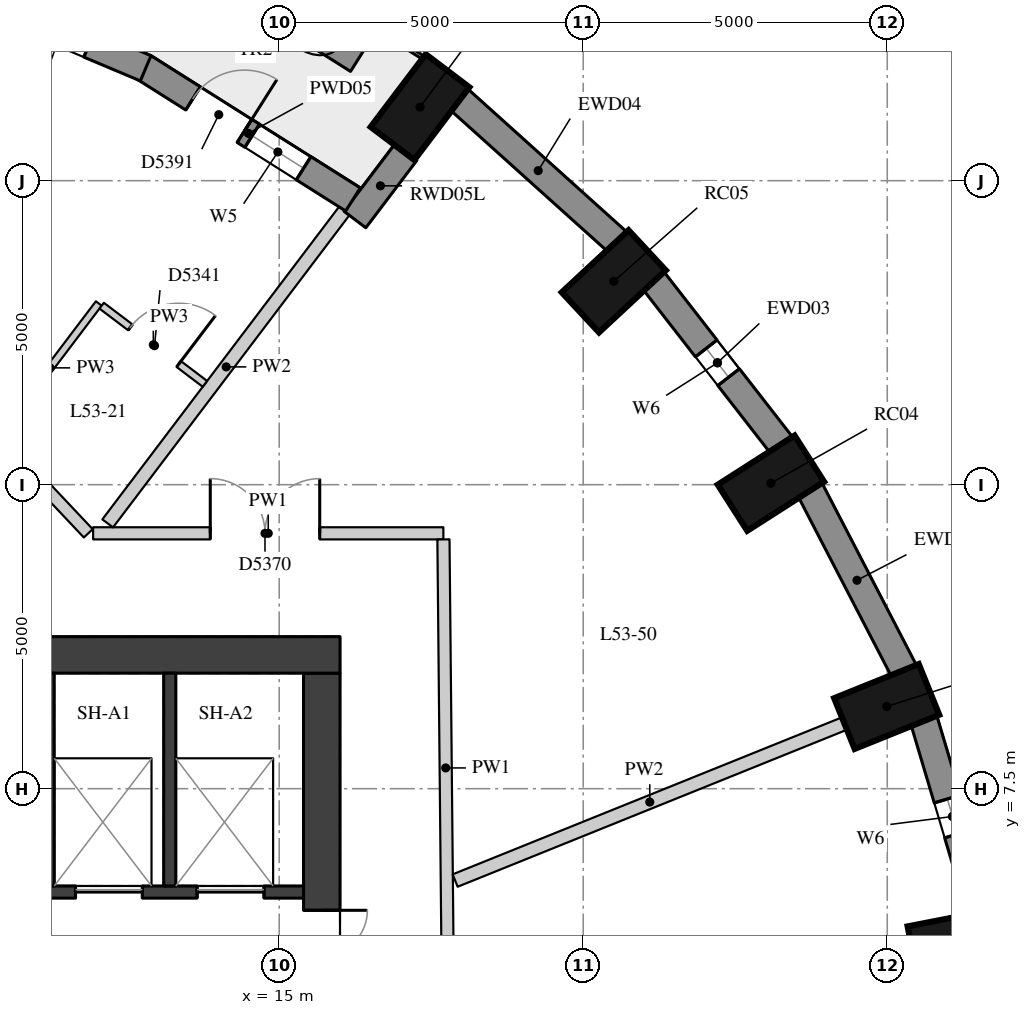
"""IFC4 building model, lengths in metres.
Left out: names, types, materials, properties, quantities, classifications, styles, units other than length and angle.
Written with IfcOpenShell. Run it as: python <this file> out.ifc"""

import sys

from ifc_helpers import new_model, si_unit, direction, frame, frame_2d, origin, origin_2d, place, context, subcontext, project, spatial, rectangle, extrude, element, fill, save


model = new_model("IFC4")
c1 = context("Model", 3, precision=1e-05, world=origin(), true_north=direction((0.0, 1.0)))
c2 = subcontext(c1, "Body", "Model", "MODEL_VIEW")
j1 = project(units=[si_unit("LENGTHUNIT", "METRE"), si_unit("PLANEANGLEUNIT", "RADIAN")], contexts=[c1])
p1 = place(None, origin())
s1 = spatial("IfcSite", under=j1, at=p1, CompositionType="ELEMENT")
p2 = place(p1, origin())
s2 = spatial("IfcBuilding", under=s1, at=p2, CompositionType="ELEMENT")
p3 = place(p2, frame((0.0, 0.0, 189.2)))
s3 = spatial("IfcBuildingStorey", under=s2, at=p3, CompositionType="ELEMENT", Elevation=189.2)
for number, where, z_axis, x_axis in (
    (1, (26.157, 4.937, 0.0), (0.0, 0.0, 1.0), (0.981, 0.192, 0.0)),
    (2, (24.991, 8.852, 0.0), (0.0, 0.0, 1.0), (0.927, 0.374, 0.0)),
    (3, (23.087, 12.525, 0.0), (0.0, 0.0, 1.0), (0.842, 0.539, 0.0)),
    (4, (20.502, 15.845, 0.0), (0.0, 0.0, 1.0), (0.732, 0.681, 0.0)),
    (5, (17.316, 18.71, 0.0), (0.0, 0.0, 1.0), (0.604, 0.797, 0.0)),
):
    element("IfcColumn", number, at=place(p3, frame(where, z_axis=z_axis, x_axis=x_axis)), inside=s3, PredefinedType="COLUMN", context=c2, shape_type="SweptSolid", body=[
        extrude(rectangle(XDim=1.5, YDim=0.9, at=origin_2d()), origin(), (0.0, 0.0, 1.0), 3.3),
    ])
p4 = place(p3, frame((26.548, 5.452, 0.0), z_axis=(0.0, 0.0, 1.0), x_axis=(-0.285444972963, 0.958395099847, 0.0)))
e6 = element("IfcWall", 6, at=p4, inside=s3, PredefinedType="SOLIDWALL", context=c2, shape_type="SweptSolid", body=[
    extrude(rectangle(XDim=3.32, YDim=0.45, at=frame_2d((1.66, 0.0))), origin(), (0.0, 0.0, 1.0), 3.02),
])
p5 = place(p4, frame((1.36, 0.0, 0.4)))
e7 = element("IfcOpeningElement", 7, at=p5, cuts=e6, PredefinedType="OPENING", context=c2, shape_type="SweptSolid", body=[
    extrude(rectangle(XDim=0.6, YDim=1.75, at=frame_2d((0.3, 0.875))), frame((0.0, 0.235, 0.0), z_axis=(0.0, -1.0, 0.0), x_axis=(1.0, 0.0, 0.0)), (0.0, 0.0, 1.0), 0.47),
])
p6 = place(p3, frame((25.278, 9.432, 0.0), z_axis=(0.0, 0.0, 1.0), x_axis=(-0.460175500475, 0.887827972505, 0.0)))
e8 = element("IfcWall", 8, at=p6, inside=s3, PredefinedType="SOLIDWALL", context=c2, shape_type="SweptSolid", body=[
    extrude(rectangle(XDim=3.371, YDim=0.45, at=frame_2d((1.685, 0.0))), origin(), (0.0, 0.0, 1.0), 3.02),
])
p7 = place(p3, frame((23.263, 13.148, 0.0), z_axis=(0.0, 0.0, 1.0), x_axis=(-0.614220816451, 0.789134201919, 0.0)))
e9 = element("IfcWall", 9, at=p7, inside=s3, PredefinedType="SOLIDWALL", context=c2, shape_type="SweptSolid", body=[
    extrude(rectangle(XDim=3.438, YDim=0.45, at=frame_2d((1.719, 0.0))), origin(), (0.0, 0.0, 1.0), 3.02),
])
p8 = place(p7, frame((1.419, 0.0, 0.4)))
e10 = element("IfcOpeningElement", 10, at=p8, cuts=e9, PredefinedType="OPENING", context=c2, shape_type="SweptSolid", body=[
    extrude(rectangle(XDim=0.6, YDim=1.75, at=frame_2d((0.3, 0.875))), frame((0.0, 0.235, 0.0), z_axis=(0.0, -1.0, 0.0), x_axis=(1.0, 0.0, 0.0)), (0.0, 0.0, 1.0), 0.47),
])
p9 = place(p3, frame((20.565, 16.49, 0.0), z_axis=(0.0, 0.0, 1.0), x_axis=(-0.743442727602, 0.668799604348, 0.0)))
e11 = element("IfcWall", 11, at=p9, inside=s3, PredefinedType="SOLIDWALL", context=c2, shape_type="SweptSolid", body=[
    extrude(rectangle(XDim=3.513, YDim=0.45, at=frame_2d((1.756, 0.0))), origin(), (0.0, 0.0, 1.0), 3.02),
])
p10 = place(p3, frame((17.085, 17.97, 0.0), z_axis=(0.0, 0.0, 1.0), x_axis=(-0.603644757989, -0.797253414011, 0.0)))
e12 = element("IfcWall", 12, at=p10, inside=s3, PredefinedType="SOLIDWALL", context=c2, shape_type="SweptSolid", body=[
    extrude(rectangle(XDim=1.391, YDim=0.45, at=frame_2d((0.695, 0.0))), origin(), (0.0, 0.0, 1.0), 3.02),
])
p11 = place(p3, frame((16.213, 17.192, 0.0), z_axis=(0.0, 0.0, 1.0), x_axis=(-0.84545185308, 0.534051649303, 0.0)))
e13 = element("IfcWall", 13, at=p11, inside=s3, PredefinedType="SOLIDWALL", context=c2, shape_type="SweptSolid", body=[
    extrude(rectangle(XDim=4.071, YDim=0.45, at=frame_2d((2.036, 0.0))), origin(), (0.0, 0.0, 1.0), 3.02),
])
p12 = place(p11, frame((0.961, 0.0, 0.4)))
e14 = element("IfcOpeningElement", 14, at=p12, cuts=e13, PredefinedType="OPENING", context=c2, shape_type="SweptSolid", body=[
    extrude(rectangle(XDim=1.0, YDim=1.75, at=frame_2d((0.5, 0.875))), frame((0.0, 0.235, 0.0), z_axis=(0.0, -1.0, 0.0), x_axis=(1.0, 0.0, 0.0)), (0.0, 0.0, 1.0), 0.47),
])
p13 = place(p11, frame((2.111, 0.0, 0.0)))
e15 = element("IfcOpeningElement", 15, at=p13, cuts=e13, PredefinedType="OPENING", context=c2, shape_type="SweptSolid", body=[
    extrude(rectangle(XDim=1.0, YDim=2.15, at=frame_2d((0.5, 1.075))), frame((0.0, 0.235, 0.0), z_axis=(0.0, -1.0, 0.0), x_axis=(1.0, 0.0, 0.0)), (0.0, 0.0, 1.0), 0.47),
])
p14 = place(p3, frame((12.804, 19.349, 0.0), z_axis=(0.0, 0.0, 1.0), x_axis=(-0.921751093055, 0.387782055351, 0.0)))
e16 = element("IfcWall", 16, at=p14, inside=s3, PredefinedType="SOLIDWALL", context=c2, shape_type="SweptSolid", body=[
    extrude(rectangle(XDim=4.168, YDim=0.45, at=frame_2d((2.084, 0.0))), origin(), (0.0, 0.0, 1.0), 3.02),
])
p15 = place(p14, frame((1.009, 0.0, 0.4)))
e17 = element("IfcOpeningElement", 17, at=p15, cuts=e16, PredefinedType="OPENING", context=c2, shape_type="SweptSolid", body=[
    extrude(rectangle(XDim=1.0, YDim=1.75, at=frame_2d((0.5, 0.875))), frame((0.0, 0.235, 0.0), z_axis=(0.0, -1.0, 0.0), x_axis=(1.0, 0.0, 0.0)), (0.0, 0.0, 1.0), 0.47),
])
p16 = place(p14, frame((2.159, 0.0, 0.0)))
e18 = element("IfcOpeningElement", 18, at=p16, cuts=e16, PredefinedType="OPENING", context=c2, shape_type="SweptSolid", body=[
    extrude(rectangle(XDim=1.0, YDim=2.15, at=frame_2d((0.5, 1.075))), frame((0.0, 0.235, 0.0), z_axis=(0.0, -1.0, 0.0), x_axis=(1.0, 0.0, 0.0)), (0.0, 0.0, 1.0), 0.47),
])
p17 = place(p3, frame((16.36, 19.593, 0.0), z_axis=(0.0, 0.0, 1.0), x_axis=(-0.846149017978, 0.532946375703, 0.0)))
e19 = element("IfcWall", 19, at=p17, inside=s3, PredefinedType="USERDEFINED", context=c2, shape_type="SweptSolid", body=[
    extrude(rectangle(XDim=1.8, YDim=0.7, at=frame_2d((0.9, 0.0))), origin(), (0.0, 0.0, 1.0), 0.75),
])
p18 = place(p3, frame((15.7, -9.4, 0.0), z_axis=(0.0, 0.0, 1.0), x_axis=(0.0, 1.0, 0.0)))
e20 = element("IfcWall", 20, at=p18, inside=s3, PredefinedType="SHEAR", context=c2, shape_type="SweptSolid", body=[
    extrude(rectangle(XDim=18.8, YDim=0.6, at=frame_2d((9.4, 0.0))), origin(), (0.0, 0.0, 1.0), 3.02),
])
p19 = place(p18, frame((13.4, 0.0, 0.0)))
e21 = element("IfcOpeningElement", 21, at=p19, cuts=e20, PredefinedType="OPENING", context=c2, shape_type="SweptSolid", body=[
    extrude(rectangle(XDim=1.5, YDim=2.1, at=frame_2d((0.75, 1.05))), frame((0.0, 0.31, 0.0), z_axis=(0.0, -1.0, 0.0), x_axis=(1.0, 0.0, 0.0)), (0.0, 0.0, 1.0), 0.62),
])
p20 = place(p18, frame((3.9, 0.0, 0.0)))
e22 = element("IfcOpeningElement", 22, at=p20, cuts=e20, PredefinedType="OPENING", context=c2, shape_type="SweptSolid", body=[
    extrude(rectangle(XDim=1.5, YDim=2.1, at=frame_2d((0.75, 1.05))), frame((0.0, 0.31, 0.0), z_axis=(0.0, -1.0, 0.0), x_axis=(1.0, 0.0, 0.0)), (0.0, 0.0, 1.0), 0.62),
])
p21 = place(p3, frame((4.0, 9.7, 0.0), z_axis=(0.0, 0.0, 1.0), x_axis=(1.0, 0.0, 0.0)))
e23 = element("IfcWall", 23, at=p21, inside=s3, PredefinedType="SHEAR", context=c2, shape_type="SweptSolid", body=[
    extrude(rectangle(XDim=12.0, YDim=0.6, at=frame_2d((6.0, 0.0))), origin(), (0.0, 0.0, 1.0), 3.02),
])
p22 = place(p3, frame((4.6, 5.8, 0.0), z_axis=(0.0, 0.0, 1.0), x_axis=(1.0, 0.0, 0.0)))
e24 = element("IfcWall", 24, at=p22, inside=s3, PredefinedType="SHEAR", context=c2, shape_type="SweptSolid", body=[
    extrude(rectangle(XDim=10.8, YDim=0.2, at=frame_2d((5.4, 0.0))), origin(), (0.0, 0.0, 1.0), 3.02),
])
p23 = place(p22, frame((7.05, 0.0, 0.0)))
e25 = element("IfcOpeningElement", 25, at=p23, cuts=e24, PredefinedType="OPENING", context=c2, shape_type="SweptSolid", body=[
    extrude(rectangle(XDim=1.1, YDim=2.1, at=frame_2d((0.55, 1.05))), frame((0.0, 0.11, 0.0), z_axis=(0.0, -1.0, 0.0), x_axis=(1.0, 0.0, 0.0)), (0.0, 0.0, 1.0), 0.22),
])
p24 = place(p22, frame((9.05, 0.0, 0.0)))
e26 = element("IfcOpeningElement", 26, at=p24, cuts=e24, PredefinedType="OPENING", context=c2, shape_type="SweptSolid", body=[
    extrude(rectangle(XDim=1.1, YDim=2.1, at=frame_2d((0.55, 1.05))), frame((0.0, 0.11, 0.0), z_axis=(0.0, -1.0, 0.0), x_axis=(1.0, 0.0, 0.0)), (0.0, 0.0, 1.0), 0.22),
])
for number, where, z_axis, x_axis in (
    (27, (11.2, 5.9, 0.0), (0.0, 0.0, 1.0), (0.0, 1.0, 0.0)),
    (28, (13.2, 5.9, 0.0), (0.0, 0.0, 1.0), (0.0, 1.0, 0.0)),
):
    element("IfcWall", number, at=place(p3, frame(where, z_axis=z_axis, x_axis=x_axis)), inside=s3, PredefinedType="SHEAR", context=c2, shape_type="SweptSolid", body=[
        extrude(rectangle(XDim=3.5, YDim=0.2, at=frame_2d((1.75, 0.0))), origin(), (0.0, 0.0, 1.0), 3.02),
    ])
p25 = place(p3, frame((9.916, 13.762, 0.0), z_axis=(0.0, 0.0, 1.0), x_axis=(0.686041532799, -0.727562378958, 0.0)))
e29 = element("IfcWall", 29, at=p25, inside=s3, PredefinedType="PARTITIONING", context=c2, shape_type="SweptSolid", body=[
    extrude(rectangle(XDim=2.834, YDim=0.2, at=frame_2d((1.417, 0.0))), origin(), (0.0, 0.0, 1.0), 3.02),
])
p26 = place(p3, frame((11.94, 11.7, 0.0), z_axis=(0.0, 0.0, 1.0), x_axis=(1.0, 0.0, 0.0)))
e30 = element("IfcWall", 30, at=p26, inside=s3, PredefinedType="PARTITIONING", context=c2, shape_type="SweptSolid", body=[
    extrude(rectangle(XDim=5.76, YDim=0.2, at=frame_2d((2.88, 0.0))), origin(), (0.0, 0.0, 1.0), 3.02),
])
p27 = place(p26, frame((1.927, 0.0, 0.0)))
e31 = element("IfcOpeningElement", 31, at=p27, cuts=e30, PredefinedType="OPENING", context=c2, shape_type="SweptSolid", body=[
    extrude(rectangle(XDim=1.8, YDim=2.1, at=frame_2d((0.9, 1.05))), frame((0.0, 0.11, 0.0), z_axis=(0.0, -1.0, 0.0), x_axis=(1.0, 0.0, 0.0)), (0.0, 0.0, 1.0), 0.22),
])
p28 = place(p3, frame((17.701, 11.6, 0.0), z_axis=(0.0, 0.0, 1.0), x_axis=(0.009840700525, -0.999951579134, 0.0)))
e32 = element("IfcWall", 32, at=p28, inside=s3, PredefinedType="PARTITIONING", context=c2, shape_type="SweptSolid", body=[
    extrude(rectangle(XDim=7.517, YDim=0.2, at=frame_2d((3.759, 0.0))), origin(), (0.0, 0.0, 1.0), 3.02),
])
p29 = place(p3, frame((24.295, 8.571, 0.0), z_axis=(0.0, 0.0, 1.0), x_axis=(-0.927397147779, -0.374078240869, 0.0)))
e33 = element("IfcWall", 33, at=p29, inside=s3, PredefinedType="PARTITIONING", context=c2, shape_type="SweptSolid", body=[
    extrude(rectangle(XDim=6.903, YDim=0.22, at=frame_2d((3.452, 0.0))), origin(), (0.0, 0.0, 1.0), 3.02),
])
p30 = place(p3, frame((16.077, 17.011, 0.0), z_axis=(0.0, 0.0, 1.0), x_axis=(-0.603635635975, -0.797260320712, 0.0)))
e34 = element("IfcWall", 34, at=p30, inside=s3, PredefinedType="PARTITIONING", context=c2, shape_type="SweptSolid", body=[
    extrude(rectangle(XDim=6.457, YDim=0.22, at=frame_2d((3.229, 0.0))), origin(), (0.0, 0.0, 1.0), 3.02),
])
p31 = place(p3, frame((10.43, 13.363, 0.0), z_axis=(0.0, 0.0, 1.0), x_axis=(0.603597479969, 0.797289208616, 0.0)))
e35 = element("IfcWall", 35, at=p31, inside=s3, PredefinedType="PARTITIONING", context=c2, shape_type="SweptSolid", body=[
    extrude(rectangle(XDim=2.656, YDim=0.12, at=frame_2d((1.328, 0.0))), origin(), (0.0, 0.0, 1.0), 3.02),
])
p32 = place(p3, frame((12.081, 15.444, 0.0), z_axis=(0.0, 0.0, 1.0), x_axis=(0.797240905551, -0.603661277967, 0.0)))
e36 = element("IfcWall", 36, at=p32, inside=s3, PredefinedType="PARTITIONING", context=c2, shape_type="SweptSolid", body=[
    extrude(rectangle(XDim=2.13, YDim=0.12, at=frame_2d((1.065, 0.0))), origin(), (0.0, 0.0, 1.0), 3.02),
])
p33 = place(p32, frame((0.59, 0.0, 0.0)))
e37 = element("IfcOpeningElement", 37, at=p33, cuts=e36, PredefinedType="OPENING", context=c2, shape_type="SweptSolid", body=[
    extrude(rectangle(XDim=1.0, YDim=2.1, at=frame_2d((0.5, 1.05))), frame((0.0, 0.07, 0.0), z_axis=(0.0, -1.0, 0.0), x_axis=(1.0, 0.0, 0.0)), (0.0, 0.0, 1.0), 0.14),
])
p34 = place(p5, origin())
e38 = element("IfcWindow", 38, at=p34, inside=s3, PartitioningType="SINGLE_PANEL", PredefinedType="WINDOW", context=c2, shape_type="SweptSolid", body=[
    extrude(rectangle(XDim=0.6, YDim=1.75, at=frame_2d((0.3, 0.875))), frame((0.0, 0.035, 0.0), z_axis=(0.0, -1.0, 0.0), x_axis=(1.0, 0.0, 0.0)), (0.0, 0.0, 1.0), 0.06),
])
fill(e7, e38)
p35 = place(p8, origin())
e39 = element("IfcWindow", 39, at=p35, inside=s3, PartitioningType="SINGLE_PANEL", PredefinedType="WINDOW", context=c2, shape_type="SweptSolid", body=[
    extrude(rectangle(XDim=0.6, YDim=1.75, at=frame_2d((0.3, 0.875))), frame((0.0, 0.035, 0.0), z_axis=(0.0, -1.0, 0.0), x_axis=(1.0, 0.0, 0.0)), (0.0, 0.0, 1.0), 0.06),
])
fill(e10, e39)
p36 = place(p12, origin())
e40 = element("IfcWindow", 40, at=p36, inside=s3, PartitioningType="SINGLE_PANEL", PredefinedType="WINDOW", context=c2, shape_type="SweptSolid", body=[
    extrude(rectangle(XDim=1.0, YDim=1.75, at=frame_2d((0.5, 0.875))), frame((0.0, 0.035, 0.0), z_axis=(0.0, -1.0, 0.0), x_axis=(1.0, 0.0, 0.0)), (0.0, 0.0, 1.0), 0.06),
])
fill(e14, e40)
p37 = place(p13, frame((1.0, 0.0, 0.0), z_axis=(0.0, 0.0, 1.0), x_axis=(-1.0, 0.0, 0.0)))
e41 = element("IfcDoor", 41, at=p37, inside=s3, OperationType="SINGLE_SWING_RIGHT", PredefinedType="DOOR", context=c2, shape_type="SweptSolid", body=[
    extrude(rectangle(XDim=1.0, YDim=2.15, at=frame_2d((0.5, 1.075))), frame((0.0, 0.075, 0.0), z_axis=(0.0, -1.0, 0.0), x_axis=(1.0, 0.0, 0.0)), (0.0, 0.0, 1.0), 0.05),
])
fill(e15, e41)
p38 = place(p19, origin())
e42 = element("IfcDoor", 42, at=p38, inside=s3, OperationType="DOUBLE_DOOR_SINGLE_SWING", PredefinedType="DOOR", context=c2, shape_type="SweptSolid", body=[
    extrude(rectangle(XDim=1.5, YDim=2.1, at=frame_2d((0.75, 1.05))), frame((0.0, 0.025, 0.0), z_axis=(0.0, -1.0, 0.0), x_axis=(1.0, 0.0, 0.0)), (0.0, 0.0, 1.0), 0.05),
])
fill(e21, e42)
p39 = place(p23, origin())
e43 = element("IfcDoor", 43, at=p39, inside=s3, OperationType="DOUBLE_DOOR_SLIDING", PredefinedType="DOOR", context=c2, shape_type="SweptSolid", body=[
    extrude(rectangle(XDim=1.1, YDim=2.1, at=frame_2d((0.55, 1.05))), frame((0.0, 0.025, 0.0), z_axis=(0.0, -1.0, 0.0), x_axis=(1.0, 0.0, 0.0)), (0.0, 0.0, 1.0), 0.05),
])
fill(e25, e43)
p40 = place(p24, origin())
e44 = element("IfcDoor", 44, at=p40, inside=s3, OperationType="DOUBLE_DOOR_SLIDING", PredefinedType="DOOR", context=c2, shape_type="SweptSolid", body=[
    extrude(rectangle(XDim=1.1, YDim=2.1, at=frame_2d((0.55, 1.05))), frame((0.0, 0.025, 0.0), z_axis=(0.0, -1.0, 0.0), x_axis=(1.0, 0.0, 0.0)), (0.0, 0.0, 1.0), 0.05),
])
fill(e26, e44)
p41 = place(p33, origin())
e45 = element("IfcDoor", 45, at=p41, inside=s3, OperationType="SINGLE_SWING_RIGHT", PredefinedType="DOOR", context=c2, shape_type="SweptSolid", body=[
    extrude(rectangle(XDim=1.0, YDim=2.1, at=frame_2d((0.5, 1.05))), frame((0.0, 0.025, 0.0), z_axis=(0.0, -1.0, 0.0), x_axis=(1.0, 0.0, 0.0)), (0.0, 0.0, 1.0), 0.05),
])
fill(e37, e45)
p42 = place(p27, origin())
e46 = element("IfcDoor", 46, at=p42, inside=s3, OperationType="DOUBLE_DOOR_SINGLE_SWING", PredefinedType="DOOR", context=c2, shape_type="SweptSolid", body=[
    extrude(rectangle(XDim=1.8, YDim=2.1, at=frame_2d((0.9, 1.05))), frame((0.0, 0.025, 0.0), z_axis=(0.0, -1.0, 0.0), x_axis=(1.0, 0.0, 0.0)), (0.0, 0.0, 1.0), 0.05),
])
fill(e31, e46)
save(model, sys.argv[1])
